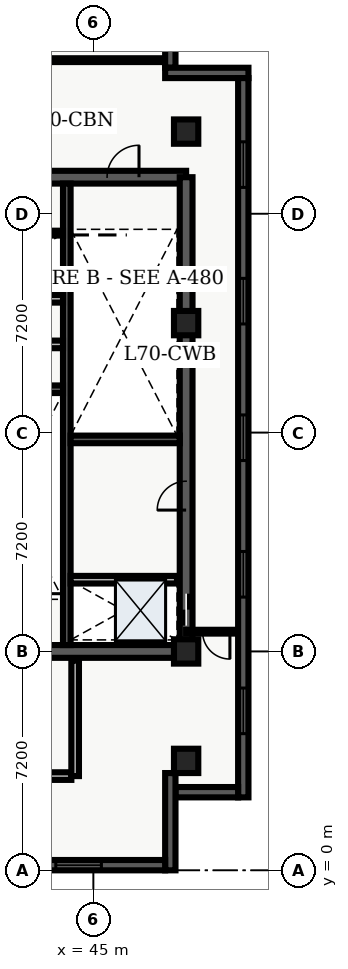
"""IFC4 building model, lengths in metres.
Left out: names, types, materials, properties, quantities, classifications, styles, units other than length and angle.
Written with IfcOpenShell. Run it as: python <this file> out.ifc"""

import sys

from ifc_helpers import new_model, entity, si_unit, converted_unit, direction, frame, origin_with_axes, origin_2d_with_axis, place, context, subcontext, project, spatial, polyline, rectangle, outline, extrude, element, fill, save


model = new_model("IFC4")
c1 = context("Model", 3, precision=1e-05, world=origin_with_axes(), true_north=direction((0.0, 1.0)))
c2 = subcontext(c1, "Body", "Model", "MODEL_VIEW")
j1 = project(units=[si_unit("LENGTHUNIT", "METRE"), converted_unit("PLANEANGLEUNIT", "DEGREE", entity("IfcPlaneAngleMeasure", 0.017), si_unit("PLANEANGLEUNIT", "RADIAN"), dimensions=[0, 0, 0, 0, 0, 0, 0])], contexts=[c1])
p1 = place(None, origin_with_axes())
s1 = spatial("IfcSite", under=j1, at=p1, CompositionType="ELEMENT")
p2 = place(p1, origin_with_axes())
s2 = spatial("IfcBuilding", under=s1, at=p2, CompositionType="ELEMENT")
p3 = place(p2, frame((0.0, 0.0, 284.1), z_axis=(0.0, 0.0, 1.0), x_axis=(1.0, 0.0, 0.0)))
s3 = spatial("IfcBuildingStorey", under=s2, at=p3, CompositionType="ELEMENT", Elevation=284.1)
p4 = place(p3, frame((40.2, 7.2, 0.0), z_axis=(0.0, 0.0, 1.0), x_axis=(1.0, 0.0, 0.0)))
e1 = element("IfcWall", 1, at=p4, inside=s3, PredefinedType="SHEAR", context=c2, shape_type="SweptSolid", body=[
    extrude(outline(polyline([(0.0, -0.21), (7.85, -0.21), (7.85, 0.21), (0.0, 0.21), (0.0, -0.21)])), origin_with_axes(), (0.0, 0.0, 1.0), 3.6),
])
p5 = place(p4, frame((2.175, 0.0, 0.0), z_axis=(0.0, 0.0, 1.0), x_axis=(1.0, 0.0, 0.0)))
e2 = element("IfcOpeningElement", 2, at=p5, cuts=e1, PredefinedType="OPENING", context=c2, shape_type="SweptSolid", body=[
    extrude(rectangle(XDim=1.05, YDim=0.44, at=origin_2d_with_axis()), origin_with_axes(), (0.0, 0.0, 1.0), 2.15),
])
p6 = place(p3, frame((40.2, 22.8, 0.0), z_axis=(0.0, 0.0, 1.0), x_axis=(1.0, 0.0, 0.0)))
e3 = element("IfcWall", 3, at=p6, inside=s3, PredefinedType="SHEAR", context=c2, shape_type="SweptSolid", body=[
    extrude(outline(polyline([(0.0, -0.21), (7.85, -0.21), (7.85, 0.21), (0.0, 0.21), (0.0, -0.21)])), origin_with_axes(), (0.0, 0.0, 1.0), 3.6),
])
p7 = place(p6, frame((5.775, 0.0, 0.0), z_axis=(0.0, 0.0, 1.0), x_axis=(1.0, 0.0, 0.0)))
e4 = element("IfcOpeningElement", 4, at=p7, cuts=e3, PredefinedType="OPENING", context=c2, shape_type="SweptSolid", body=[
    extrude(rectangle(XDim=1.05, YDim=0.44, at=origin_2d_with_axis()), origin_with_axes(), (0.0, 0.0, 1.0), 2.15),
])
p8 = place(p6, frame((2.15, 0.0, 0.0), z_axis=(0.0, 0.0, 1.0), x_axis=(1.0, 0.0, 0.0)))
e5 = element("IfcOpeningElement", 5, at=p8, cuts=e3, PredefinedType="OPENING", context=c2, shape_type="SweptSolid", body=[
    extrude(rectangle(XDim=0.9, YDim=0.44, at=origin_2d_with_axis()), origin_with_axes(), (0.0, 0.0, 1.0), 2.15),
])
p9 = place(p3, frame((48.05, 7.2, 0.0), z_axis=(0.0, 0.0, 1.0), x_axis=(0.0, 1.0, 0.0)))
e6 = element("IfcWall", 6, at=p9, inside=s3, PredefinedType="SHEAR", context=c2, shape_type="SweptSolid", body=[
    extrude(outline(polyline([(0.0, -0.21), (15.6, -0.21), (15.6, 0.21), (0.0, 0.21), (0.0, -0.21)])), origin_with_axes(), (0.0, 0.0, 1.0), 3.6),
])
p10 = place(p9, frame((1.375, 0.0, 0.0), z_axis=(0.0, 0.0, 1.0), x_axis=(1.0, 0.0, 0.0)))
e7 = element("IfcOpeningElement", 7, at=p10, cuts=e6, PredefinedType="OPENING", context=c2, shape_type="SweptSolid", body=[
    extrude(rectangle(XDim=1.05, YDim=0.44, at=origin_2d_with_axis()), origin_with_axes(), (0.0, 0.0, 1.0), 2.15),
])
p11 = place(p9, frame((5.125, 0.0, 0.0), z_axis=(0.0, 0.0, 1.0), x_axis=(1.0, 0.0, 0.0)))
e8 = element("IfcOpeningElement", 8, at=p11, cuts=e6, PredefinedType="OPENING", context=c2, shape_type="SweptSolid", body=[
    extrude(rectangle(XDim=0.95, YDim=0.44, at=origin_2d_with_axis()), origin_with_axes(), (0.0, 0.0, 1.0), 2.15),
])
p12 = place(p3, frame((44.125, 7.41, 0.0), z_axis=(0.0, 0.0, 1.0), x_axis=(0.0, 1.0, 0.0)))
e9 = element("IfcWall", 9, at=p12, inside=s3, PredefinedType="SHEAR", context=c2, shape_type="SweptSolid", body=[
    extrude(outline(polyline([(0.0, -0.125), (15.18, -0.125), (15.18, 0.125), (0.0, 0.125), (0.0, -0.125)])), origin_with_axes(), (0.0, 0.0, 1.0), 3.6),
])
for number, where, z_axis, x_axis in (
    (10, (40.41, 15.825, 0.0), (0.0, 0.0, 1.0), (1.0, 0.0, 0.0)),
    (11, (44.25, 14.175, 0.0), (0.0, 0.0, 1.0), (1.0, 0.0, 0.0)),
):
    element("IfcWall", number, at=place(p3, frame(where, z_axis=z_axis, x_axis=x_axis)), inside=s3, PredefinedType="SHEAR", context=c2, shape_type="SweptSolid", body=[
        extrude(outline(polyline([(0.0, -0.125), (3.59, -0.125), (3.59, 0.125), (0.0, 0.125), (0.0, -0.125)])), origin_with_axes(), (0.0, 0.0, 1.0), 3.6),
    ])
p13 = place(p3, frame((40.5, 17.3, 0.0), z_axis=(0.0, 0.0, 1.0), x_axis=(1.0, 0.0, 0.0)))
e12 = element("IfcWall", 12, at=p13, inside=s3, PredefinedType="SOLIDWALL", context=c2, shape_type="SweptSolid", body=[
    extrude(outline(polyline([(0.0, -0.125), (3.5, -0.125), (3.5, 0.125), (0.0, 0.125), (0.0, -0.125)])), origin_with_axes(), (0.0, 0.0, 1.0), 2.64),
])
p14 = place(p13, frame((2.4, 0.0, 0.0), z_axis=(0.0, 0.0, 1.0), x_axis=(1.0, 0.0, 0.0)))
e13 = element("IfcOpeningElement", 13, at=p14, cuts=e12, PredefinedType="OPENING", context=c2, shape_type="SweptSolid", body=[
    extrude(rectangle(XDim=0.9, YDim=0.27, at=origin_2d_with_axis()), origin_with_axes(), (0.0, 0.0, 1.0), 2.15),
])
p15 = place(p3, frame((40.5, 18.8, 0.0), z_axis=(0.0, 0.0, 1.0), x_axis=(1.0, 0.0, 0.0)))
e14 = element("IfcWall", 14, at=p15, inside=s3, PredefinedType="SOLIDWALL", context=c2, shape_type="SweptSolid", body=[
    extrude(outline(polyline([(0.0, -0.125), (3.5, -0.125), (3.5, 0.125), (0.0, 0.125), (0.0, -0.125)])), origin_with_axes(), (0.0, 0.0, 1.0), 2.64),
])
p16 = place(p3, frame((40.325, 3.1, 0.0), z_axis=(0.0, 0.0, 1.0), x_axis=(1.0, 0.0, 0.0)))
e15 = element("IfcWall", 15, at=p16, inside=s3, PredefinedType="SOLIDWALL", context=c2, shape_type="SweptSolid", body=[
    extrude(outline(polyline([(0.0, -0.125), (3.95, -0.125), (3.95, 0.125), (0.0, 0.125), (0.0, -0.125)])), origin_with_axes(), (0.0, 0.0, 1.0), 2.64),
])
p17 = place(p3, frame((44.4, 3.1, 0.0), z_axis=(0.0, 0.0, 1.0), x_axis=(0.0, 1.0, 0.0)))
e16 = element("IfcWall", 16, at=p17, inside=s3, PredefinedType="SOLIDWALL", context=c2, shape_type="SweptSolid", body=[
    extrude(outline(polyline([(0.0, -0.125), (3.8, -0.125), (3.8, 0.125), (0.0, 0.125), (0.0, -0.125)])), origin_with_axes(), (0.0, 0.0, 1.0), 2.64),
])
for number, where, z_axis, x_axis in (
    (17, (48.05, 3.6, 0.0), (0.0, 0.0, 1.0), (1.0, 0.0, 0.0)),
    (18, (48.05, 7.2, 0.0), (0.0, 0.0, 1.0), (1.0, 0.0, 0.0)),
    (19, (48.05, 18.0, 0.0), (0.0, 0.0, 1.0), (1.0, 0.0, 0.0)),
    (20, (48.05, 24.3, 0.0), (0.0, 0.0, 1.0), (1.0, 0.0, 0.0)),
):
    element("IfcColumn", number, at=place(p3, frame(where, z_axis=z_axis, x_axis=x_axis)), inside=s3, PredefinedType="COLUMN", context=c2, shape_type="SweptSolid", body=[
        extrude(rectangle(XDim=0.8, YDim=0.8, at=origin_2d_with_axis()), origin_with_axes(), (0.0, 0.0, 1.0), 3.9),
    ])
p18 = place(p3, frame((40.5, 20.96, 0.0), z_axis=(0.0, 0.0, 1.0), x_axis=(1.0, 0.0, 0.0)))
e21 = element("IfcWall", 21, at=p18, inside=s3, PredefinedType="PARTITIONING", context=c2, shape_type="SweptSolid", body=[
    extrude(outline(polyline([(0.0, -0.08), (3.5, -0.08), (3.5, 0.08), (0.0, 0.08), (0.0, -0.08)])), origin_with_axes(), (0.0, 0.0, 1.0), 2.64),
])
p19 = place(p3, frame((44.25, 9.56, 0.0), z_axis=(0.0, 0.0, 1.0), x_axis=(1.0, 0.0, 0.0)))
e22 = element("IfcWall", 22, at=p19, inside=s3, PredefinedType="SOLIDWALL", context=c2, shape_type="SweptSolid", body=[
    extrude(outline(polyline([(0.0, -0.125), (3.5, -0.125), (3.5, 0.125), (0.0, 0.125), (0.0, -0.125)])), origin_with_axes(), (0.0, 0.0, 1.0), 2.64),
])
p20 = place(p3, frame((49.765, 7.85, 0.0), z_axis=(0.0, 0.0, 1.0), x_axis=(-1.0, 0.0, 0.0)))
e23 = element("IfcWall", 23, at=p20, inside=s3, PredefinedType="PARTITIONING", context=c2, shape_type="SweptSolid", body=[
    extrude(outline(polyline([(0.0, -0.062), (1.715, -0.062), (1.715, 0.062), (0.0, 0.062), (0.0, -0.062)])), origin_with_axes(), (0.0, 0.0, 1.0), 2.64),
])
p21 = place(p20, frame((0.725, 0.0, 0.0), z_axis=(0.0, 0.0, 1.0), x_axis=(1.0, 0.0, 0.0)))
e24 = element("IfcOpeningElement", 24, at=p21, cuts=e23, PredefinedType="OPENING", context=c2, shape_type="SweptSolid", body=[
    extrude(rectangle(XDim=0.9, YDim=0.145, at=origin_2d_with_axis()), origin_with_axes(), (0.0, 0.0, 1.0), 2.15),
])
p22 = place(p3, frame((34.535, 26.65, 0.0), z_axis=(0.0, 0.0, 1.0), x_axis=(1.0, 0.0, 0.0)))
e25 = element("IfcWall", 25, at=p22, inside=s3, PredefinedType="PARTITIONING", context=c2, shape_type="SweptSolid", body=[
    extrude(outline(polyline([(0.0, -0.062), (12.995, -0.062), (12.995, 0.062), (0.0, 0.062), (0.0, -0.062)])), origin_with_axes(), (0.0, 0.0, 1.0), 2.64),
])
p23 = place(p22, frame((8.465, 0.0, 0.0), z_axis=(0.0, 0.0, 1.0), x_axis=(1.0, 0.0, 0.0)))
e26 = element("IfcOpeningElement", 26, at=p23, cuts=e25, PredefinedType="OPENING", context=c2, shape_type="SweptSolid", body=[
    extrude(rectangle(XDim=1.0, YDim=0.145, at=origin_2d_with_axis()), origin_with_axes(), (0.0, 0.0, 1.0), 2.15),
])
p24 = place(p3, frame((47.53, 28.46, 0.0), z_axis=(0.0, 0.0, 1.0), x_axis=(0.0, -1.0, 0.0)))
e27 = element("IfcWall", 27, at=p24, inside=s3, PredefinedType="SOLIDWALL", context=c2, shape_type="SweptSolid", body=[
    extrude(outline(polyline([(0.0, -0.17), (2.06, -0.17), (2.06, 0.17), (0.0, 0.17), (0.0, -0.17)])), origin_with_axes(), (0.0, 0.0, 1.0), 3.6),
])
p25 = place(p3, frame((47.36, 26.23, 0.0), z_axis=(0.0, 0.0, 1.0), x_axis=(1.0, 0.0, 0.0)))
e28 = element("IfcWall", 28, at=p25, inside=s3, PredefinedType="SOLIDWALL", context=c2, shape_type="SweptSolid", body=[
    extrude(outline(polyline([(0.0, -0.17), (2.74, -0.17), (2.74, 0.17), (0.0, 0.17), (0.0, -0.17)])), origin_with_axes(), (0.0, 0.0, 1.0), 3.6),
])
p26 = place(p3, frame((49.93, 26.06, 0.0), z_axis=(0.0, 0.0, 1.0), x_axis=(0.0, -1.0, 0.0)))
e29 = element("IfcWall", 29, at=p26, inside=s3, PredefinedType="SOLIDWALL", context=c2, shape_type="SweptSolid", body=[
    extrude(outline(polyline([(0.0, -0.17), (23.66, -0.17), (23.66, 0.17), (0.0, 0.17), (0.0, -0.17)])), origin_with_axes(), (0.0, 0.0, 1.0), 3.6),
])
p27 = place(p26, frame((2.846, 0.0, 0.45), z_axis=(0.0, 0.0, 1.0), x_axis=(1.0, 0.0, 0.0)))
e30 = element("IfcOpeningElement", 30, at=p27, cuts=e29, PredefinedType="OPENING", context=c2, shape_type="SweptSolid", body=[
    extrude(rectangle(XDim=1.5, YDim=0.36, at=origin_2d_with_axis()), origin_with_axes(), (0.0, 0.0, 1.0), 2.1),
])
p28 = place(p26, frame((7.338, 0.0, 0.45), z_axis=(0.0, 0.0, 1.0), x_axis=(1.0, 0.0, 0.0)))
e31 = element("IfcOpeningElement", 31, at=p28, cuts=e29, PredefinedType="OPENING", context=c2, shape_type="SweptSolid", body=[
    extrude(rectangle(XDim=1.5, YDim=0.36, at=origin_2d_with_axis()), origin_with_axes(), (0.0, 0.0, 1.0), 2.1),
])
p29 = place(p26, frame((11.83, 0.0, 0.45), z_axis=(0.0, 0.0, 1.0), x_axis=(1.0, 0.0, 0.0)))
e32 = element("IfcOpeningElement", 32, at=p29, cuts=e29, PredefinedType="OPENING", context=c2, shape_type="SweptSolid", body=[
    extrude(rectangle(XDim=1.5, YDim=0.36, at=origin_2d_with_axis()), origin_with_axes(), (0.0, 0.0, 1.0), 2.1),
])
p30 = place(p26, frame((16.322, 0.0, 0.45), z_axis=(0.0, 0.0, 1.0), x_axis=(1.0, 0.0, 0.0)))
e33 = element("IfcOpeningElement", 33, at=p30, cuts=e29, PredefinedType="OPENING", context=c2, shape_type="SweptSolid", body=[
    extrude(rectangle(XDim=1.5, YDim=0.36, at=origin_2d_with_axis()), origin_with_axes(), (0.0, 0.0, 1.0), 2.1),
])
p31 = place(p26, frame((20.814, 0.0, 0.45), z_axis=(0.0, 0.0, 1.0), x_axis=(1.0, 0.0, 0.0)))
e34 = element("IfcOpeningElement", 34, at=p31, cuts=e29, PredefinedType="OPENING", context=c2, shape_type="SweptSolid", body=[
    extrude(rectangle(XDim=1.5, YDim=0.36, at=origin_2d_with_axis()), origin_with_axes(), (0.0, 0.0, 1.0), 2.1),
])
p32 = place(p3, frame((49.76, 2.57, 0.0), z_axis=(0.0, 0.0, 1.0), x_axis=(-1.0, 0.0, 0.0)))
e35 = element("IfcWall", 35, at=p32, inside=s3, PredefinedType="SOLIDWALL", context=c2, shape_type="SweptSolid", body=[
    extrude(outline(polyline([(0.0, -0.17), (2.06, -0.17), (2.06, 0.17), (0.0, 0.17), (0.0, -0.17)])), origin_with_axes(), (0.0, 0.0, 1.0), 3.6),
])
p33 = place(p3, frame((47.53, 3.2, 0.0), z_axis=(0.0, 0.0, 1.0), x_axis=(0.0, -1.0, 0.0)))
e36 = element("IfcWall", 36, at=p33, inside=s3, PredefinedType="SOLIDWALL", context=c2, shape_type="SweptSolid", body=[
    extrude(outline(polyline([(0.0, -0.17), (3.2, -0.17), (3.2, 0.17), (0.0, 0.17), (0.0, -0.17)])), origin_with_axes(), (0.0, 0.0, 1.0), 3.6),
])
p34 = place(p3, frame((47.36, 0.17, 0.0), z_axis=(0.0, 0.0, 1.0), x_axis=(-1.0, 0.0, 0.0)))
e37 = element("IfcWall", 37, at=p34, inside=s3, PredefinedType="SOLIDWALL", context=c2, shape_type="SweptSolid", body=[
    extrude(outline(polyline([(0.0, -0.17), (37.16, -0.17), (37.16, 0.17), (0.0, 0.17), (0.0, -0.17)])), origin_with_axes(), (0.0, 0.0, 1.0), 3.6),
])
p35 = place(p34, frame((2.847, 0.0, 0.45), z_axis=(0.0, 0.0, 1.0), x_axis=(1.0, 0.0, 0.0)))
e38 = element("IfcOpeningElement", 38, at=p35, cuts=e37, PredefinedType="OPENING", context=c2, shape_type="SweptSolid", body=[
    extrude(rectangle(XDim=1.5, YDim=0.36, at=origin_2d_with_axis()), origin_with_axes(), (0.0, 0.0, 1.0), 2.1),
])
p36 = place(p34, frame((7.342, 0.0, 0.45), z_axis=(0.0, 0.0, 1.0), x_axis=(1.0, 0.0, 0.0)))
e39 = element("IfcOpeningElement", 39, at=p36, cuts=e37, PredefinedType="OPENING", context=c2, shape_type="SweptSolid", body=[
    extrude(rectangle(XDim=1.5, YDim=0.36, at=origin_2d_with_axis()), origin_with_axes(), (0.0, 0.0, 1.0), 2.1),
])
p37 = place(p34, frame((11.837, 0.0, 0.45), z_axis=(0.0, 0.0, 1.0), x_axis=(1.0, 0.0, 0.0)))
e40 = element("IfcOpeningElement", 40, at=p37, cuts=e37, PredefinedType="OPENING", context=c2, shape_type="SweptSolid", body=[
    extrude(rectangle(XDim=1.5, YDim=0.36, at=origin_2d_with_axis()), origin_with_axes(), (0.0, 0.0, 1.0), 2.1),
])
p38 = place(p34, frame((16.332, 0.0, 0.45), z_axis=(0.0, 0.0, 1.0), x_axis=(1.0, 0.0, 0.0)))
e41 = element("IfcOpeningElement", 41, at=p38, cuts=e37, PredefinedType="OPENING", context=c2, shape_type="SweptSolid", body=[
    extrude(rectangle(XDim=1.5, YDim=0.36, at=origin_2d_with_axis()), origin_with_axes(), (0.0, 0.0, 1.0), 2.1),
])
p39 = place(p34, frame((20.827, 0.0, 0.45), z_axis=(0.0, 0.0, 1.0), x_axis=(1.0, 0.0, 0.0)))
e42 = element("IfcOpeningElement", 42, at=p39, cuts=e37, PredefinedType="OPENING", context=c2, shape_type="SweptSolid", body=[
    extrude(rectangle(XDim=1.5, YDim=0.36, at=origin_2d_with_axis()), origin_with_axes(), (0.0, 0.0, 1.0), 2.1),
])
p40 = place(p34, frame((25.322, 0.0, 0.45), z_axis=(0.0, 0.0, 1.0), x_axis=(1.0, 0.0, 0.0)))
e43 = element("IfcOpeningElement", 43, at=p40, cuts=e37, PredefinedType="OPENING", context=c2, shape_type="SweptSolid", body=[
    extrude(rectangle(XDim=1.5, YDim=0.36, at=origin_2d_with_axis()), origin_with_axes(), (0.0, 0.0, 1.0), 2.1),
])
p41 = place(p34, frame((29.817, 0.0, 0.45), z_axis=(0.0, 0.0, 1.0), x_axis=(1.0, 0.0, 0.0)))
e44 = element("IfcOpeningElement", 44, at=p41, cuts=e37, PredefinedType="OPENING", context=c2, shape_type="SweptSolid", body=[
    extrude(rectangle(XDim=1.5, YDim=0.36, at=origin_2d_with_axis()), origin_with_axes(), (0.0, 0.0, 1.0), 2.1),
])
p42 = place(p34, frame((34.312, 0.0, 0.45), z_axis=(0.0, 0.0, 1.0), x_axis=(1.0, 0.0, 0.0)))
e45 = element("IfcOpeningElement", 45, at=p42, cuts=e37, PredefinedType="OPENING", context=c2, shape_type="SweptSolid", body=[
    extrude(rectangle(XDim=1.5, YDim=0.36, at=origin_2d_with_axis()), origin_with_axes(), (0.0, 0.0, 1.0), 2.1),
])
p43 = place(p9, frame((1.375, 0.0, 0.0), z_axis=(0.0, 0.0, 1.0), x_axis=(1.0, 0.0, 0.0)))
e46 = element("IfcDoor", 46, at=p43, inside=s3, OperationType="SLIDING_TO_LEFT", PredefinedType="DOOR", context=c2, shape_type="SweptSolid", body=[
    extrude(rectangle(XDim=1.05, YDim=0.09, at=origin_2d_with_axis()), origin_with_axes(), (0.0, 0.0, 1.0), 2.15),
])
fill(e7, e46)
p44 = place(p6, frame((5.775, 0.0, 0.0), z_axis=(0.0, 0.0, 1.0), x_axis=(1.0, 0.0, 0.0)))
e47 = element("IfcDoor", 47, at=p44, inside=s3, OperationType="SINGLE_SWING_RIGHT", PredefinedType="DOOR", context=c2, shape_type="SweptSolid", body=[
    extrude(rectangle(XDim=1.05, YDim=0.09, at=origin_2d_with_axis()), origin_with_axes(), (0.0, 0.0, 1.0), 2.15),
])
fill(e4, e47)
p45 = place(p9, frame((5.125, 0.0, 0.0), z_axis=(0.0, 0.0, 1.0), x_axis=(1.0, 0.0, 0.0)))
e48 = element("IfcDoor", 48, at=p45, inside=s3, OperationType="SINGLE_SWING_LEFT", PredefinedType="DOOR", context=c2, shape_type="SweptSolid", body=[
    extrude(rectangle(XDim=0.95, YDim=0.09, at=origin_2d_with_axis()), origin_with_axes(), (0.0, 0.0, 1.0), 2.15),
])
fill(e8, e48)
p46 = place(p20, frame((0.725, 0.0, 0.0), z_axis=(0.0, 0.0, 1.0), x_axis=(1.0, 0.0, 0.0)))
e49 = element("IfcDoor", 49, at=p46, inside=s3, OperationType="SINGLE_SWING_LEFT", PredefinedType="DOOR", context=c2, shape_type="SweptSolid", body=[
    extrude(rectangle(XDim=0.9, YDim=0.075, at=origin_2d_with_axis()), origin_with_axes(), (0.0, 0.0, 1.0), 2.15),
])
fill(e24, e49)
p47 = place(p26, frame((2.846, 0.0, 0.45), z_axis=(0.0, 0.0, 1.0), x_axis=(1.0, 0.0, 0.0)))
e50 = element("IfcWindow", 50, at=p47, inside=s3, PredefinedType="WINDOW", context=c2, shape_type="SweptSolid", body=[
    extrude(rectangle(XDim=1.5, YDim=0.09, at=origin_2d_with_axis()), origin_with_axes(), (0.0, 0.0, 1.0), 2.1),
])
fill(e30, e50)
p48 = place(p26, frame((7.338, 0.0, 0.45), z_axis=(0.0, 0.0, 1.0), x_axis=(1.0, 0.0, 0.0)))
e51 = element("IfcWindow", 51, at=p48, inside=s3, PredefinedType="WINDOW", context=c2, shape_type="SweptSolid", body=[
    extrude(rectangle(XDim=1.5, YDim=0.09, at=origin_2d_with_axis()), origin_with_axes(), (0.0, 0.0, 1.0), 2.1),
])
fill(e31, e51)
p49 = place(p26, frame((11.83, 0.0, 0.45), z_axis=(0.0, 0.0, 1.0), x_axis=(1.0, 0.0, 0.0)))
e52 = element("IfcWindow", 52, at=p49, inside=s3, PredefinedType="WINDOW", context=c2, shape_type="SweptSolid", body=[
    extrude(rectangle(XDim=1.5, YDim=0.09, at=origin_2d_with_axis()), origin_with_axes(), (0.0, 0.0, 1.0), 2.1),
])
fill(e32, e52)
p50 = place(p26, frame((16.322, 0.0, 0.45), z_axis=(0.0, 0.0, 1.0), x_axis=(1.0, 0.0, 0.0)))
e53 = element("IfcWindow", 53, at=p50, inside=s3, PredefinedType="WINDOW", context=c2, shape_type="SweptSolid", body=[
    extrude(rectangle(XDim=1.5, YDim=0.09, at=origin_2d_with_axis()), origin_with_axes(), (0.0, 0.0, 1.0), 2.1),
])
fill(e33, e53)
p51 = place(p26, frame((20.814, 0.0, 0.45), z_axis=(0.0, 0.0, 1.0), x_axis=(1.0, 0.0, 0.0)))
e54 = element("IfcWindow", 54, at=p51, inside=s3, PredefinedType="WINDOW", context=c2, shape_type="SweptSolid", body=[
    extrude(rectangle(XDim=1.5, YDim=0.09, at=origin_2d_with_axis()), origin_with_axes(), (0.0, 0.0, 1.0), 2.1),
])
fill(e34, e54)
p52 = place(p34, frame((2.847, 0.0, 0.45), z_axis=(0.0, 0.0, 1.0), x_axis=(1.0, 0.0, 0.0)))
e55 = element("IfcWindow", 55, at=p52, inside=s3, PredefinedType="WINDOW", context=c2, shape_type="SweptSolid", body=[
    extrude(rectangle(XDim=1.5, YDim=0.09, at=origin_2d_with_axis()), origin_with_axes(), (0.0, 0.0, 1.0), 2.1),
])
fill(e38, e55)
save(model, sys.argv[1])
